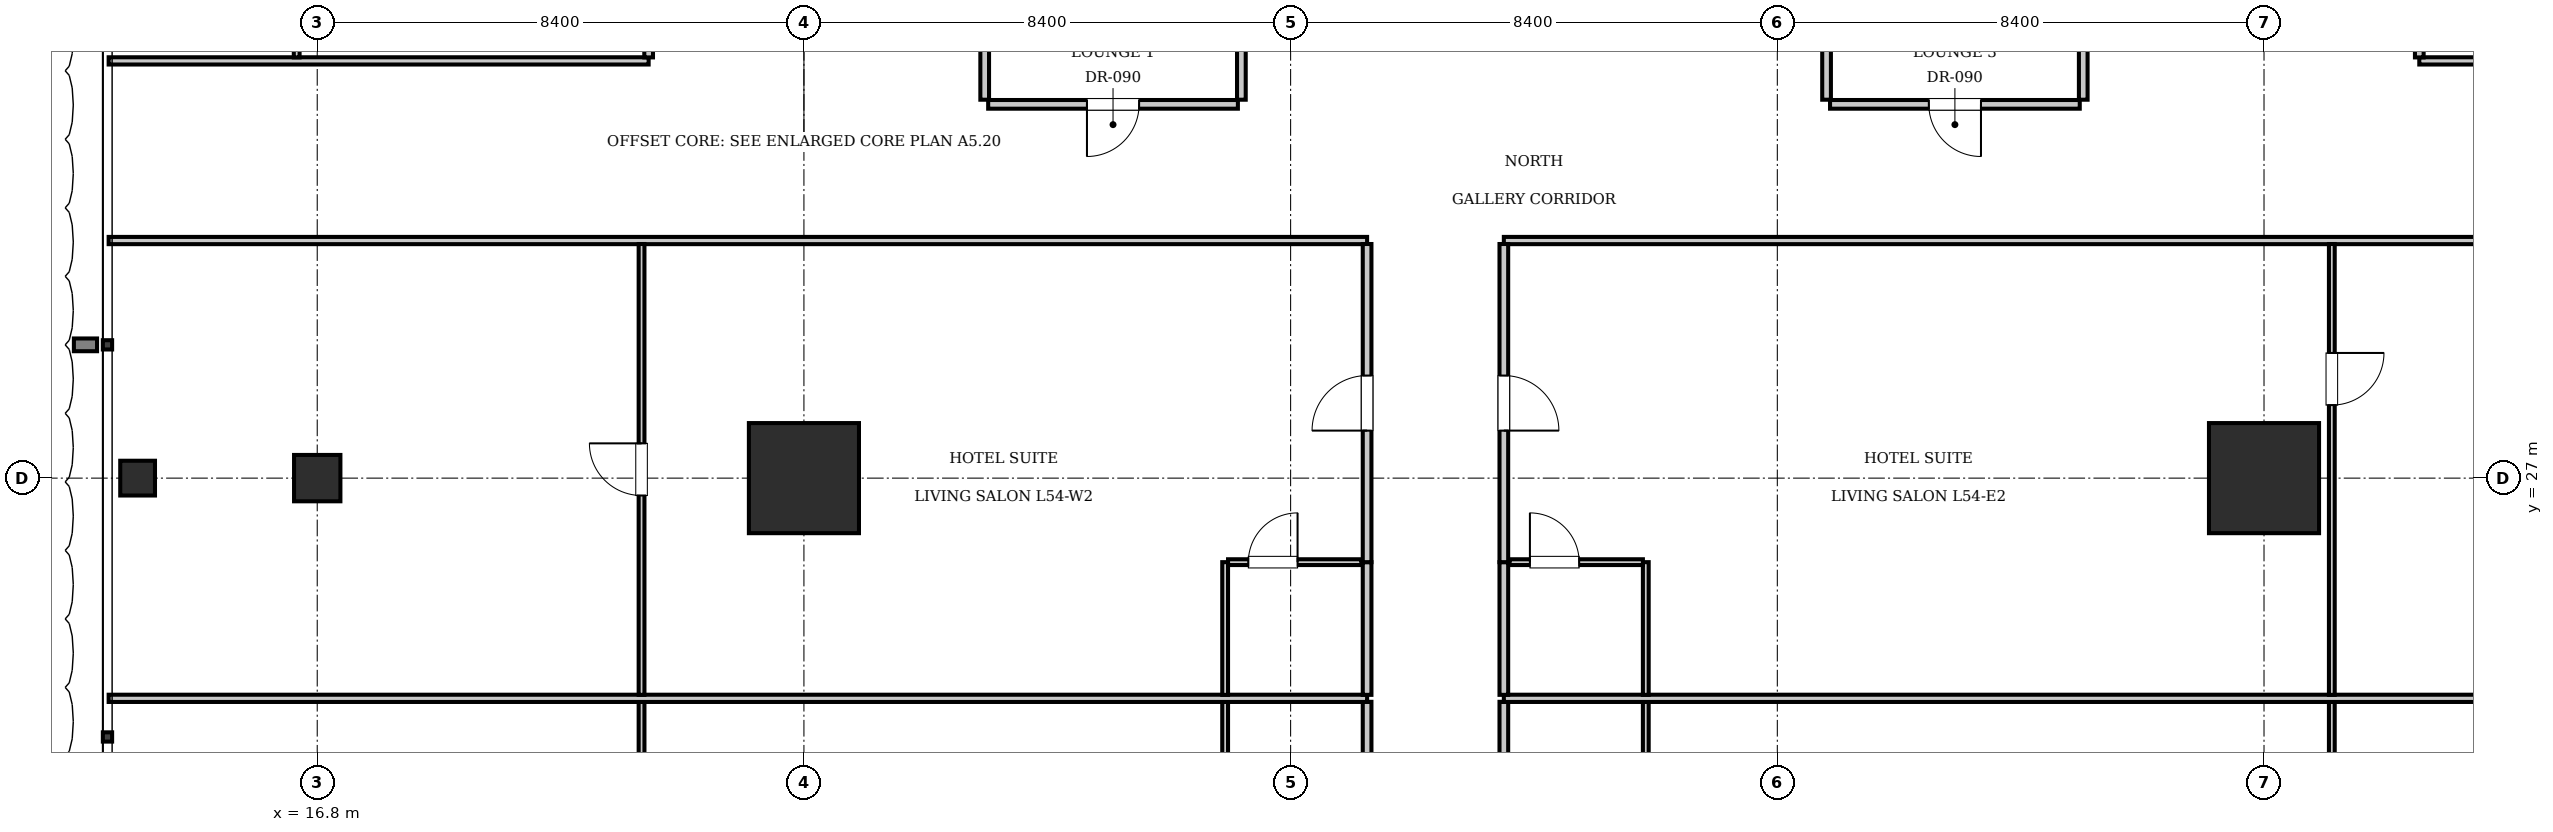
"""IFC4 building model, lengths in metres.
Left out: names, types, materials, properties, quantities, classifications, styles, units other than length and angle.
Written with IfcOpenShell. Run it as: python <this file> out.ifc"""

import sys

from ifc_helpers import new_model, si_unit, direction, frame, frame_2d, origin, origin_2d, place, context, subcontext, project, spatial, rectangle, i_section, extrude, element, fill, save


model = new_model("IFC4")
c1 = context("Model", 3, precision=1e-05, world=origin(), true_north=direction((0.0, 1.0)))
c2 = subcontext(c1, "Body", "Model", "MODEL_VIEW")
j1 = project(units=[si_unit("LENGTHUNIT", "METRE"), si_unit("PLANEANGLEUNIT", "RADIAN")], contexts=[c1])
p1 = place(None, origin())
s1 = spatial("IfcSite", under=j1, at=p1, CompositionType="ELEMENT")
p2 = place(p1, origin())
s2 = spatial("IfcBuilding", under=s1, at=p2, CompositionType="ELEMENT")
p3 = place(p2, frame((0.0, 0.0, 219.8)))
s3 = spatial("IfcBuildingStorey", under=s2, at=p3, CompositionType="ELEMENT", Elevation=219.8)
for number, where, z_axis, x_axis in (
    (1, (25.2, 27.0, 0.0), (0.0, 0.0, 1.0), (1.0, 0.0, 0.0)),
    (2, (50.4, 27.0, 0.0), (0.0, 0.0, 1.0), (1.0, 0.0, 0.0)),
):
    element("IfcColumn", number, at=place(p3, frame(where, z_axis=z_axis, x_axis=x_axis)), inside=s3, PredefinedType="COLUMN", context=c2, shape_type="SweptSolid", body=[
        extrude(rectangle(XDim=1.9, YDim=1.9, at=origin_2d()), origin(), (0.0, 0.0, 1.0), 3.85),
    ])
p4 = place(p3, frame((16.8, 27.0, 0.0), z_axis=(0.0, 0.0, 1.0), x_axis=(1.0, 0.0, 0.0)))
e3 = element("IfcColumn", 3, at=p4, inside=s3, PredefinedType="COLUMN", context=c2, shape_type="SweptSolid", body=[
    extrude(rectangle(XDim=0.8, YDim=0.8, at=origin_2d()), origin(), (0.0, 0.0, 1.0), 3.85),
])
p5 = place(p3, frame((13.7, 27.0, 0.0), z_axis=(0.0, 0.0, 1.0), x_axis=(1.0, 0.0, 0.0)))
e4 = element("IfcColumn", 4, at=p5, inside=s3, PredefinedType="COLUMN", context=c2, shape_type="SweptSolid", body=[
    extrude(i_section(OverallWidth=0.6, OverallDepth=0.6, WebThickness=0.025, FlangeThickness=0.038, at=origin_2d()), origin(), (0.0, 0.0, 1.0), 3.85),
])
for number, where, z_axis, x_axis in (
    (5, (28.32, 33.53, 0.0), (0.0, 0.0, 1.0), (0.0, 1.0, 0.0)),
    (6, (32.75, 33.53, 0.0), (0.0, 0.0, 1.0), (0.0, 1.0, 0.0)),
):
    element("IfcWall", number, at=place(p3, frame(where, z_axis=z_axis, x_axis=x_axis)), inside=s3, PredefinedType="PARTITIONING", context=c2, shape_type="SweptSolid", body=[
        extrude(rectangle(XDim=2.59, YDim=0.15, at=frame_2d((1.295, 0.0))), origin(), (0.0, 0.0, 1.0), 3.61),
    ])
p6 = place(p3, frame((28.38, 33.45, 0.0), z_axis=(0.0, 0.0, 1.0), x_axis=(1.0, 0.0, 0.0)))
e7 = element("IfcWall", 7, at=p6, inside=s3, PredefinedType="PARTITIONING", context=c2, shape_type="SweptSolid", body=[
    extrude(rectangle(XDim=4.31, YDim=0.15, at=frame_2d((2.155, 0.0))), origin(), (0.0, 0.0, 1.0), 3.61),
])
p7 = place(p6, frame((1.705, 0.0, 0.0)))
e8 = element("IfcOpeningElement", 8, at=p7, cuts=e7, PredefinedType="OPENING", context=c2, shape_type="SweptSolid", body=[
    extrude(rectangle(XDim=0.9, YDim=2.1, at=frame_2d((0.45, 1.05))), frame((0.0, 0.085, 0.0), z_axis=(0.0, -1.0, 0.0), x_axis=(1.0, 0.0, 0.0)), (0.0, 0.0, 1.0), 0.17),
])
for number, where, z_axis, x_axis in (
    (9, (42.85, 33.53, 0.0), (0.0, 0.0, 1.0), (0.0, 1.0, 0.0)),
    (10, (47.28, 33.53, 0.0), (0.0, 0.0, 1.0), (0.0, 1.0, 0.0)),
):
    element("IfcWall", number, at=place(p3, frame(where, z_axis=z_axis, x_axis=x_axis)), inside=s3, PredefinedType="PARTITIONING", context=c2, shape_type="SweptSolid", body=[
        extrude(rectangle(XDim=2.59, YDim=0.15, at=frame_2d((1.295, 0.0))), origin(), (0.0, 0.0, 1.0), 3.61),
    ])
p8 = place(p3, frame((42.91, 33.45, 0.0), z_axis=(0.0, 0.0, 1.0), x_axis=(1.0, 0.0, 0.0)))
e11 = element("IfcWall", 11, at=p8, inside=s3, PredefinedType="PARTITIONING", context=c2, shape_type="SweptSolid", body=[
    extrude(rectangle(XDim=4.31, YDim=0.15, at=frame_2d((2.155, 0.0))), origin(), (0.0, 0.0, 1.0), 3.61),
])
p9 = place(p8, frame((1.705, 0.0, 0.0)))
e12 = element("IfcOpeningElement", 12, at=p9, cuts=e11, PredefinedType="OPENING", context=c2, shape_type="SweptSolid", body=[
    extrude(rectangle(XDim=0.9, YDim=2.1, at=frame_2d((0.45, 1.05))), frame((0.0, 0.085, 0.0), z_axis=(0.0, -1.0, 0.0), x_axis=(1.0, 0.0, 0.0)), (0.0, 0.0, 1.0), 0.17),
])
p10 = place(p3, frame((13.2, 31.1, 0.0), z_axis=(0.0, 0.0, 1.0), x_axis=(1.0, 0.0, 0.0)))
e13 = element("IfcWall", 13, at=p10, inside=s3, PredefinedType="PARTITIONING", context=c2, shape_type="SweptSolid", body=[
    extrude(rectangle(XDim=21.72, YDim=0.125, at=frame_2d((10.86, 0.0))), origin(), (0.0, 0.0, 1.0), 3.61),
])
p11 = place(p3, frame((37.28, 31.1, 0.0), z_axis=(0.0, 0.0, 1.0), x_axis=(1.0, 0.0, 0.0)))
e14 = element("IfcWall", 14, at=p11, inside=s3, PredefinedType="PARTITIONING", context=c2, shape_type="SweptSolid", body=[
    extrude(rectangle(XDim=25.12, YDim=0.125, at=frame_2d((12.56, 0.0))), origin(), (0.0, 0.0, 1.0), 3.61),
])
p12 = place(p3, frame((34.92, 20.85, 0.0), z_axis=(0.0, 0.0, 1.0), x_axis=(0.0, 1.0, 0.0)))
e15 = element("IfcWall", 15, at=p12, inside=s3, PredefinedType="PARTITIONING", context=c2, shape_type="SweptSolid", body=[
    extrude(rectangle(XDim=2.29, YDim=0.15, at=frame_2d((1.145, 0.0))), origin(), (0.0, 0.0, 1.0), 3.61),
])
p13 = place(p3, frame((32.47, 20.85, 0.0), z_axis=(0.0, 0.0, 1.0), x_axis=(0.0, 1.0, 0.0)))
e16 = element("IfcWall", 16, at=p13, inside=s3, PredefinedType="PARTITIONING", context=c2, shape_type="SweptSolid", body=[
    extrude(rectangle(XDim=2.29, YDim=0.1, at=frame_2d((1.145, 0.0))), origin(), (0.0, 0.0, 1.0), 3.61),
])
p14 = place(p3, frame((22.398, 15.36, 0.0), z_axis=(0.0, 0.0, 1.0), x_axis=(0.0, 1.0, 0.0)))
e17 = element("IfcWall", 17, at=p14, inside=s3, PredefinedType="PARTITIONING", context=c2, shape_type="SweptSolid", body=[
    extrude(rectangle(XDim=7.78, YDim=0.1, at=frame_2d((3.89, 0.0))), origin(), (0.0, 0.0, 1.0), 3.61),
])
p15 = place(p14, frame((3.44, 0.0, 0.0)))
e18 = element("IfcOpeningElement", 18, at=p15, cuts=e17, PredefinedType="OPENING", context=c2, shape_type="SweptSolid", body=[
    extrude(rectangle(XDim=0.9, YDim=2.1, at=frame_2d((0.45, 1.05))), frame((0.0, 0.06, 0.0), z_axis=(0.0, -1.0, 0.0), x_axis=(1.0, 0.0, 0.0)), (0.0, 0.0, 1.0), 0.12),
])
p16 = place(p3, frame((37.28, 20.85, 0.0), z_axis=(0.0, 0.0, 1.0), x_axis=(0.0, 1.0, 0.0)))
e19 = element("IfcWall", 19, at=p16, inside=s3, PredefinedType="PARTITIONING", context=c2, shape_type="SweptSolid", body=[
    extrude(rectangle(XDim=2.29, YDim=0.15, at=frame_2d((1.145, 0.0))), origin(), (0.0, 0.0, 1.0), 3.61),
])
p17 = place(p3, frame((39.73, 20.85, 0.0), z_axis=(0.0, 0.0, 1.0), x_axis=(0.0, 1.0, 0.0)))
e20 = element("IfcWall", 20, at=p17, inside=s3, PredefinedType="PARTITIONING", context=c2, shape_type="SweptSolid", body=[
    extrude(rectangle(XDim=2.29, YDim=0.1, at=frame_2d((1.145, 0.0))), origin(), (0.0, 0.0, 1.0), 3.61),
])
p18 = place(p3, frame((51.57, 15.36, 0.0), z_axis=(0.0, 0.0, 1.0), x_axis=(0.0, 1.0, 0.0)))
e21 = element("IfcWall", 21, at=p18, inside=s3, PredefinedType="PARTITIONING", context=c2, shape_type="SweptSolid", body=[
    extrude(rectangle(XDim=7.78, YDim=0.1, at=frame_2d((3.89, 0.0))), origin(), (0.0, 0.0, 1.0), 3.61),
])
p19 = place(p18, frame((3.44, 0.0, 0.0)))
e22 = element("IfcOpeningElement", 22, at=p19, cuts=e21, PredefinedType="OPENING", context=c2, shape_type="SweptSolid", body=[
    extrude(rectangle(XDim=0.9, YDim=2.1, at=frame_2d((0.45, 1.05))), frame((0.0, 0.06, 0.0), z_axis=(0.0, -1.0, 0.0), x_axis=(1.0, 0.0, 0.0)), (0.0, 0.0, 1.0), 0.12),
])
p20 = place(p3, frame((13.2, 23.2, 0.0), z_axis=(0.0, 0.0, 1.0), x_axis=(1.0, 0.0, 0.0)))
e23 = element("IfcWall", 23, at=p20, inside=s3, PredefinedType="PARTITIONING", context=c2, shape_type="SweptSolid", body=[
    extrude(rectangle(XDim=21.72, YDim=0.125, at=frame_2d((10.86, 0.0))), origin(), (0.0, 0.0, 1.0), 3.61),
])
p21 = place(p3, frame((37.28, 23.2, 0.0), z_axis=(0.0, 0.0, 1.0), x_axis=(1.0, 0.0, 0.0)))
e24 = element("IfcWall", 24, at=p21, inside=s3, PredefinedType="PARTITIONING", context=c2, shape_type="SweptSolid", body=[
    extrude(rectangle(XDim=25.12, YDim=0.125, at=frame_2d((12.56, 0.0))), origin(), (0.0, 0.0, 1.0), 3.61),
])
p22 = place(p3, frame((34.92, 23.26, 0.0), z_axis=(0.0, 0.0, 1.0), x_axis=(0.0, 1.0, 0.0)))
e25 = element("IfcWall", 25, at=p22, inside=s3, PredefinedType="PARTITIONING", context=c2, shape_type="SweptSolid", body=[
    extrude(rectangle(XDim=2.29, YDim=0.15, at=frame_2d((1.145, 0.0))), origin(), (0.0, 0.0, 1.0), 3.61),
])
p23 = place(p3, frame((34.92, 25.55, 0.0), z_axis=(0.0, 0.0, 1.0), x_axis=(0.0, 1.0, 0.0)))
e26 = element("IfcWall", 26, at=p23, inside=s3, PredefinedType="PARTITIONING", context=c2, shape_type="SweptSolid", body=[
    extrude(rectangle(XDim=5.49, YDim=0.15, at=frame_2d((2.745, 0.0))), origin(), (0.0, 0.0, 1.0), 3.61),
])
p24 = place(p23, frame((2.27, 0.0, 0.0)))
e27 = element("IfcOpeningElement", 27, at=p24, cuts=e26, PredefinedType="OPENING", context=c2, shape_type="SweptSolid", body=[
    extrude(rectangle(XDim=0.95, YDim=2.15, at=frame_2d((0.475, 1.075))), frame((0.0, 0.085, 0.0), z_axis=(0.0, -1.0, 0.0), x_axis=(1.0, 0.0, 0.0)), (0.0, 0.0, 1.0), 0.17),
])
p25 = place(p3, frame((32.47, 23.26, 0.0), z_axis=(0.0, 0.0, 1.0), x_axis=(0.0, 1.0, 0.0)))
e28 = element("IfcWall", 28, at=p25, inside=s3, PredefinedType="PARTITIONING", context=c2, shape_type="SweptSolid", body=[
    extrude(rectangle(XDim=2.29, YDim=0.1, at=frame_2d((1.145, 0.0))), origin(), (0.0, 0.0, 1.0), 3.61),
])
p26 = place(p3, frame((32.52, 25.55, 0.0), z_axis=(0.0, 0.0, 1.0), x_axis=(1.0, 0.0, 0.0)))
e29 = element("IfcWall", 29, at=p26, inside=s3, PredefinedType="PARTITIONING", context=c2, shape_type="SweptSolid", body=[
    extrude(rectangle(XDim=2.3, YDim=0.1, at=frame_2d((1.15, 0.0))), origin(), (0.0, 0.0, 1.0), 3.61),
])
p27 = place(p26, frame((0.35, 0.0, 0.0)))
e30 = element("IfcOpeningElement", 30, at=p27, cuts=e29, PredefinedType="OPENING", context=c2, shape_type="SweptSolid", body=[
    extrude(rectangle(XDim=0.85, YDim=2.1, at=frame_2d((0.425, 1.05))), frame((0.0, 0.06, 0.0), z_axis=(0.0, -1.0, 0.0), x_axis=(1.0, 0.0, 0.0)), (0.0, 0.0, 1.0), 0.12),
])
p28 = place(p3, frame((22.398, 23.26, 0.0), z_axis=(0.0, 0.0, 1.0), x_axis=(0.0, 1.0, 0.0)))
e31 = element("IfcWall", 31, at=p28, inside=s3, PredefinedType="PARTITIONING", context=c2, shape_type="SweptSolid", body=[
    extrude(rectangle(XDim=7.78, YDim=0.1, at=frame_2d((3.89, 0.0))), origin(), (0.0, 0.0, 1.0), 3.61),
])
p29 = place(p28, frame((3.44, 0.0, 0.0)))
e32 = element("IfcOpeningElement", 32, at=p29, cuts=e31, PredefinedType="OPENING", context=c2, shape_type="SweptSolid", body=[
    extrude(rectangle(XDim=0.9, YDim=2.1, at=frame_2d((0.45, 1.05))), frame((0.0, 0.06, 0.0), z_axis=(0.0, -1.0, 0.0), x_axis=(1.0, 0.0, 0.0)), (0.0, 0.0, 1.0), 0.12),
])
p30 = place(p3, frame((37.28, 23.26, 0.0), z_axis=(0.0, 0.0, 1.0), x_axis=(0.0, 1.0, 0.0)))
e33 = element("IfcWall", 33, at=p30, inside=s3, PredefinedType="PARTITIONING", context=c2, shape_type="SweptSolid", body=[
    extrude(rectangle(XDim=2.29, YDim=0.15, at=frame_2d((1.145, 0.0))), origin(), (0.0, 0.0, 1.0), 3.61),
])
p31 = place(p3, frame((37.28, 25.55, 0.0), z_axis=(0.0, 0.0, 1.0), x_axis=(0.0, 1.0, 0.0)))
e34 = element("IfcWall", 34, at=p31, inside=s3, PredefinedType="PARTITIONING", context=c2, shape_type="SweptSolid", body=[
    extrude(rectangle(XDim=5.49, YDim=0.15, at=frame_2d((2.745, 0.0))), origin(), (0.0, 0.0, 1.0), 3.61),
])
p32 = place(p31, frame((2.27, 0.0, 0.0)))
e35 = element("IfcOpeningElement", 35, at=p32, cuts=e34, PredefinedType="OPENING", context=c2, shape_type="SweptSolid", body=[
    extrude(rectangle(XDim=0.95, YDim=2.15, at=frame_2d((0.475, 1.075))), frame((0.0, 0.085, 0.0), z_axis=(0.0, -1.0, 0.0), x_axis=(1.0, 0.0, 0.0)), (0.0, 0.0, 1.0), 0.17),
])
p33 = place(p3, frame((39.73, 23.26, 0.0), z_axis=(0.0, 0.0, 1.0), x_axis=(0.0, 1.0, 0.0)))
e36 = element("IfcWall", 36, at=p33, inside=s3, PredefinedType="PARTITIONING", context=c2, shape_type="SweptSolid", body=[
    extrude(rectangle(XDim=2.29, YDim=0.1, at=frame_2d((1.145, 0.0))), origin(), (0.0, 0.0, 1.0), 3.61),
])
p34 = place(p3, frame((37.38, 25.55, 0.0), z_axis=(0.0, 0.0, 1.0), x_axis=(1.0, 0.0, 0.0)))
e37 = element("IfcWall", 37, at=p34, inside=s3, PredefinedType="PARTITIONING", context=c2, shape_type="SweptSolid", body=[
    extrude(rectangle(XDim=2.3, YDim=0.1, at=frame_2d((1.15, 0.0))), origin(), (0.0, 0.0, 1.0), 3.61),
])
p35 = place(p34, frame((0.35, 0.0, 0.0)))
e38 = element("IfcOpeningElement", 38, at=p35, cuts=e37, PredefinedType="OPENING", context=c2, shape_type="SweptSolid", body=[
    extrude(rectangle(XDim=0.85, YDim=2.1, at=frame_2d((0.425, 1.05))), frame((0.0, 0.06, 0.0), z_axis=(0.0, -1.0, 0.0), x_axis=(1.0, 0.0, 0.0)), (0.0, 0.0, 1.0), 0.12),
])
p36 = place(p3, frame((51.57, 23.26, 0.0), z_axis=(0.0, 0.0, 1.0), x_axis=(0.0, 1.0, 0.0)))
e39 = element("IfcWall", 39, at=p36, inside=s3, PredefinedType="PARTITIONING", context=c2, shape_type="SweptSolid", body=[
    extrude(rectangle(XDim=7.78, YDim=0.1, at=frame_2d((3.89, 0.0))), origin(), (0.0, 0.0, 1.0), 3.61),
])
p37 = place(p36, frame((5.0, 0.0, 0.0)))
e40 = element("IfcOpeningElement", 40, at=p37, cuts=e39, PredefinedType="OPENING", context=c2, shape_type="SweptSolid", body=[
    extrude(rectangle(XDim=0.9, YDim=2.1, at=frame_2d((0.45, 1.05))), frame((0.0, 0.06, 0.0), z_axis=(0.0, -1.0, 0.0), x_axis=(1.0, 0.0, 0.0)), (0.0, 0.0, 1.0), 0.12),
])
p38 = place(p3, frame((13.2, 34.2, 0.0), z_axis=(0.0, 0.0, 1.0), x_axis=(1.0, 0.0, 0.0)))
e41 = element("IfcWall", 41, at=p38, inside=s3, PredefinedType="PARTITIONING", context=c2, shape_type="SweptSolid", body=[
    extrude(rectangle(XDim=9.32, YDim=0.125, at=frame_2d((4.66, 0.0))), origin(), (0.0, 0.0, 1.0), 3.61),
])
p39 = place(p3, frame((53.08, 34.2, 0.0), z_axis=(0.0, 0.0, 1.0), x_axis=(1.0, 0.0, 0.0)))
e42 = element("IfcWall", 42, at=p39, inside=s3, PredefinedType="PARTITIONING", context=c2, shape_type="SweptSolid", body=[
    extrude(rectangle(XDim=9.32, YDim=0.125, at=frame_2d((4.66, 0.0))), origin(), (0.0, 0.0, 1.0), 3.61),
])
p40 = place(p3, frame((22.52, 34.26, 0.0), z_axis=(0.0, 0.0, 1.0), x_axis=(0.0, 1.0, 0.0)))
e43 = element("IfcWall", 43, at=p40, inside=s3, PredefinedType="PARTITIONING", context=c2, shape_type="SweptSolid", body=[
    extrude(rectangle(XDim=12.927, YDim=0.15, at=frame_2d((6.464, 0.0))), origin(), (0.0, 0.0, 1.0), 3.61),
])
p41 = place(p40, frame((5.989, 0.0, 0.0)))
e44 = element("IfcOpeningElement", 44, at=p41, cuts=e43, PredefinedType="OPENING", context=c2, shape_type="SweptSolid", body=[
    extrude(rectangle(XDim=0.95, YDim=2.15, at=frame_2d((0.475, 1.075))), frame((0.0, 0.085, 0.0), z_axis=(0.0, -1.0, 0.0), x_axis=(1.0, 0.0, 0.0)), (0.0, 0.0, 1.0), 0.17),
])
p42 = place(p3, frame((16.446, 34.26, 0.0), z_axis=(0.0, 0.0, 1.0), x_axis=(0.0, 1.0, 0.0)))
e45 = element("IfcWall", 45, at=p42, inside=s3, PredefinedType="PARTITIONING", context=c2, shape_type="SweptSolid", body=[
    extrude(rectangle(XDim=15.337, YDim=0.1, at=frame_2d((7.669, 0.0))), origin(), (0.0, 0.0, 1.0), 3.61),
])
p43 = place(p42, frame((7.219, 0.0, 0.0)))
e46 = element("IfcOpeningElement", 46, at=p43, cuts=e45, PredefinedType="OPENING", context=c2, shape_type="SweptSolid", body=[
    extrude(rectangle(XDim=0.9, YDim=2.1, at=frame_2d((0.45, 1.05))), frame((0.0, 0.06, 0.0), z_axis=(0.0, -1.0, 0.0), x_axis=(1.0, 0.0, 0.0)), (0.0, 0.0, 1.0), 0.12),
])
p44 = place(p3, frame((53.08, 34.26, 0.0), z_axis=(0.0, 0.0, 1.0), x_axis=(0.0, 1.0, 0.0)))
e47 = element("IfcWall", 47, at=p44, inside=s3, PredefinedType="PARTITIONING", context=c2, shape_type="SweptSolid", body=[
    extrude(rectangle(XDim=12.927, YDim=0.15, at=frame_2d((6.464, 0.0))), origin(), (0.0, 0.0, 1.0), 3.61),
])
p45 = place(p44, frame((5.989, 0.0, 0.0)))
e48 = element("IfcOpeningElement", 48, at=p45, cuts=e47, PredefinedType="OPENING", context=c2, shape_type="SweptSolid", body=[
    extrude(rectangle(XDim=0.95, YDim=2.15, at=frame_2d((0.475, 1.075))), frame((0.0, 0.085, 0.0), z_axis=(0.0, -1.0, 0.0), x_axis=(1.0, 0.0, 0.0)), (0.0, 0.0, 1.0), 0.17),
])
p46 = place(p7, frame((0.9, 0.0, 0.0), z_axis=(0.0, 0.0, 1.0), x_axis=(-1.0, 0.0, 0.0)))
e49 = element("IfcDoor", 49, at=p46, inside=s3, OperationType="SINGLE_SWING_RIGHT", PredefinedType="DOOR", context=c2, shape_type="SweptSolid", body=[
    extrude(rectangle(XDim=0.9, YDim=2.1, at=frame_2d((0.45, 1.05))), frame((0.0, 0.025, 0.0), z_axis=(0.0, -1.0, 0.0), x_axis=(1.0, 0.0, 0.0)), (0.0, 0.0, 1.0), 0.05),
])
fill(e8, e49)
p47 = place(p9, frame((0.9, 0.0, 0.0), z_axis=(0.0, 0.0, 1.0), x_axis=(-1.0, 0.0, 0.0)))
e50 = element("IfcDoor", 50, at=p47, inside=s3, OperationType="SINGLE_SWING_LEFT", PredefinedType="DOOR", context=c2, shape_type="SweptSolid", body=[
    extrude(rectangle(XDim=0.9, YDim=2.1, at=frame_2d((0.45, 1.05))), frame((0.0, 0.025, 0.0), z_axis=(0.0, -1.0, 0.0), x_axis=(1.0, 0.0, 0.0)), (0.0, 0.0, 1.0), 0.05),
])
fill(e12, e50)
p48 = place(p27, origin())
e51 = element("IfcDoor", 51, at=p48, inside=s3, OperationType="SINGLE_SWING_RIGHT", PredefinedType="DOOR", context=c2, shape_type="SweptSolid", body=[
    extrude(rectangle(XDim=0.85, YDim=2.1, at=frame_2d((0.425, 1.05))), frame((0.0, 0.025, 0.0), z_axis=(0.0, -1.0, 0.0), x_axis=(1.0, 0.0, 0.0)), (0.0, 0.0, 1.0), 0.05),
])
fill(e30, e51)
p49 = place(p24, origin())
e52 = element("IfcDoor", 52, at=p49, inside=s3, OperationType="SINGLE_SWING_LEFT", PredefinedType="DOOR", context=c2, shape_type="SweptSolid", body=[
    extrude(rectangle(XDim=0.95, YDim=2.15, at=frame_2d((0.475, 1.075))), frame((0.0, 0.025, 0.0), z_axis=(0.0, -1.0, 0.0), x_axis=(1.0, 0.0, 0.0)), (0.0, 0.0, 1.0), 0.05),
])
fill(e27, e52)
p50 = place(p29, origin())
e53 = element("IfcDoor", 53, at=p50, inside=s3, OperationType="SINGLE_SWING_RIGHT", PredefinedType="DOOR", context=c2, shape_type="SweptSolid", body=[
    extrude(rectangle(XDim=0.9, YDim=2.1, at=frame_2d((0.45, 1.05))), frame((0.0, 0.025, 0.0), z_axis=(0.0, -1.0, 0.0), x_axis=(1.0, 0.0, 0.0)), (0.0, 0.0, 1.0), 0.05),
])
fill(e32, e53)
p51 = place(p35, origin())
e54 = element("IfcDoor", 54, at=p51, inside=s3, OperationType="SINGLE_SWING_LEFT", PredefinedType="DOOR", context=c2, shape_type="SweptSolid", body=[
    extrude(rectangle(XDim=0.85, YDim=2.1, at=frame_2d((0.425, 1.05))), frame((0.0, 0.025, 0.0), z_axis=(0.0, -1.0, 0.0), x_axis=(1.0, 0.0, 0.0)), (0.0, 0.0, 1.0), 0.05),
])
fill(e38, e54)
p52 = place(p32, frame((0.95, 0.0, 0.0), z_axis=(0.0, 0.0, 1.0), x_axis=(-1.0, 0.0, 0.0)))
e55 = element("IfcDoor", 55, at=p52, inside=s3, OperationType="SINGLE_SWING_RIGHT", PredefinedType="DOOR", context=c2, shape_type="SweptSolid", body=[
    extrude(rectangle(XDim=0.95, YDim=2.15, at=frame_2d((0.475, 1.075))), frame((0.0, 0.025, 0.0), z_axis=(0.0, -1.0, 0.0), x_axis=(1.0, 0.0, 0.0)), (0.0, 0.0, 1.0), 0.05),
])
fill(e35, e55)
p53 = place(p37, frame((0.9, 0.0, 0.0), z_axis=(0.0, 0.0, 1.0), x_axis=(-1.0, 0.0, 0.0)))
e56 = element("IfcDoor", 56, at=p53, inside=s3, OperationType="SINGLE_SWING_LEFT", PredefinedType="DOOR", context=c2, shape_type="SweptSolid", body=[
    extrude(rectangle(XDim=0.9, YDim=2.1, at=frame_2d((0.45, 1.05))), frame((0.0, 0.025, 0.0), z_axis=(0.0, -1.0, 0.0), x_axis=(1.0, 0.0, 0.0)), (0.0, 0.0, 1.0), 0.05),
])
fill(e40, e56)
save(model, sys.argv[1])
